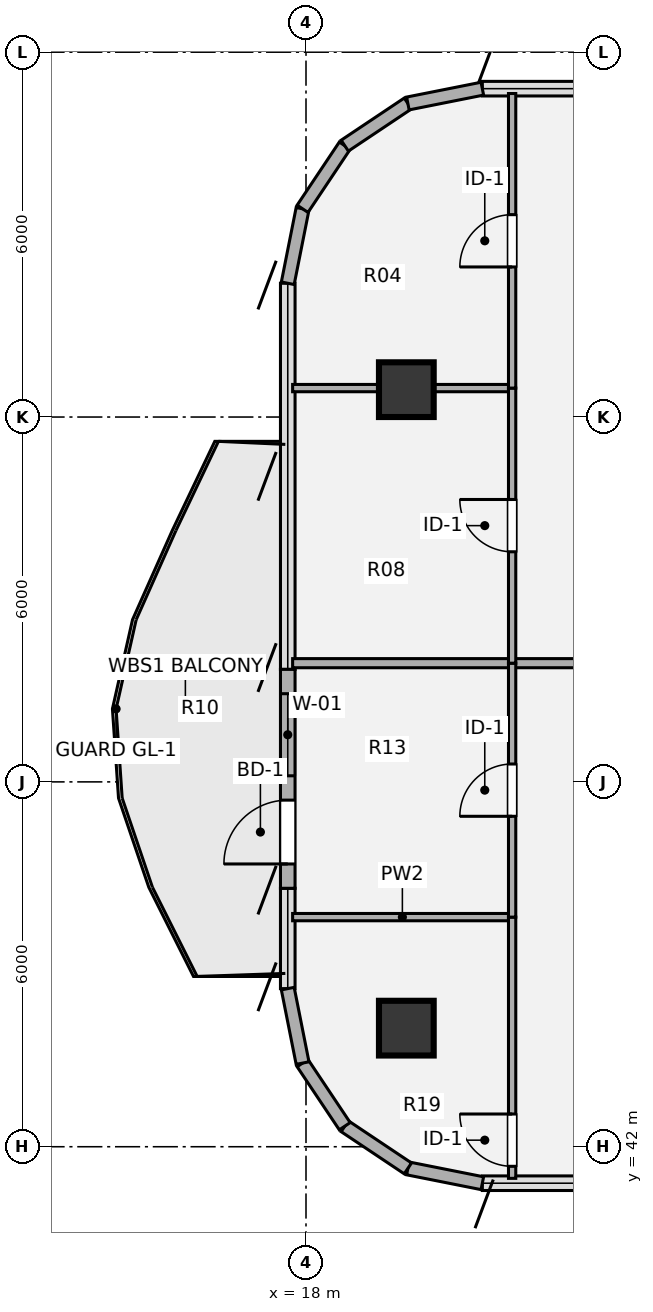
"""IFC4 building model, lengths in metres.
Left out: names, types, materials, properties, quantities, classifications, styles, units other than length and angle.
Written with IfcOpenShell. Run it as: python <this file> out.ifc"""

import sys

from ifc_helpers import new_model, si_unit, direction, frame, frame_2d, origin, origin_2d, place, context, subcontext, project, spatial, rectangle, hollow_circle, extrude, source, transform, mapped, element, fill, save


model = new_model("IFC4")
c1 = context("Model", 3, precision=1e-05, world=origin(), true_north=direction((0.0, 1.0)))
c2 = subcontext(c1, "Body", "Model", "MODEL_VIEW")
j1 = project(units=[si_unit("LENGTHUNIT", "METRE"), si_unit("PLANEANGLEUNIT", "RADIAN")], contexts=[c1])
p1 = place(None, origin())
s1 = spatial("IfcSite", under=j1, at=p1, CompositionType="ELEMENT")
p2 = place(p1, origin())
s2 = spatial("IfcBuilding", under=s1, at=p2, CompositionType="ELEMENT")
p3 = place(p2, frame((0.0, 0.0, 223.02)))
s3 = spatial("IfcBuildingStorey", under=s2, at=p3, CompositionType="ELEMENT", Elevation=223.02)
m1 = source(origin(), c2, "Body", "SweptSolid", [
    extrude(hollow_circle(Radius=0.45, WallThickness=0.032, at=origin_2d()), origin(), (0.0, 0.0, 1.0), 3.78),
])
for number, where, z_axis, x_axis in (
    (1, (19.65, 43.95, 0.0), (0.0, 0.0, 1.0), (1.0, 0.0, 0.0)),
    (2, (19.65, 54.45, 0.0), (0.0, 0.0, 1.0), (1.0, 0.0, 0.0)),
):
    element("IfcColumn", number, at=place(p3, frame(where, z_axis=z_axis, x_axis=x_axis)), inside=s3, PredefinedType="COLUMN", context=c2, shape_type="MappedRepresentation", body=[
        mapped(m1, transform((0.0, 0.0, 0.0), x_axis=(1.0, 0.0, 0.0), y_axis=(0.0, 1.0, 0.0), z_axis=(0.0, 0.0, 1.0), scale=1.0)),
    ])
for number, where, z_axis, x_axis in (
    (3, (20.9, 41.4, 0.0), (0.0, 0.0, 1.0), (-0.981, 0.195, 0.0)),
    (4, (19.675, 41.644, 0.0), (0.0, 0.0, 1.0), (-0.831, 0.556, 0.0)),
    (5, (18.637, 42.337, 0.0), (0.0, 0.0, 1.0), (-0.556, 0.831, 0.0)),
    (6, (17.944, 43.375, 0.0), (0.0, 0.0, 1.0), (-0.195, 0.981, 0.0)),
):
    element("IfcWall", number, at=place(p3, frame(where, z_axis=z_axis, x_axis=x_axis)), inside=s3, PredefinedType="SOLIDWALL", context=c2, shape_type="SweptSolid", body=[
        extrude(rectangle(XDim=1.249, YDim=0.215, at=frame_2d((0.624, 0.0))), origin(), (0.0, 0.0, 1.0), 3.53),
    ])
p4 = place(p3, frame((17.7, 46.25, 0.0), z_axis=(0.0, 0.0, 1.0), x_axis=(0.0, 1.0, 0.0)))
e7 = element("IfcWall", 7, at=p4, inside=s3, PredefinedType="SOLIDWALL", context=c2, shape_type="SweptSolid", body=[
    extrude(rectangle(XDim=3.6, YDim=0.24, at=frame_2d((1.8, 0.0))), origin(), (0.0, 0.0, 1.0), 3.53),
])
p5 = place(p4, frame((0.4, 0.0, 0.0)))
e8 = element("IfcOpeningElement", 8, at=p5, cuts=e7, PredefinedType="OPENING", context=c2, shape_type="SweptSolid", body=[
    extrude(rectangle(XDim=1.05, YDim=2.15, at=origin_2d()), frame((0.525, 0.13, 1.075), z_axis=(0.0, -1.0, 0.0), x_axis=(1.0, 0.0, 0.0)), (0.0, 0.0, 1.0), 0.26),
])
p6 = place(p4, frame((1.85, 0.0, 0.85)))
e9 = element("IfcOpeningElement", 9, at=p6, cuts=e7, PredefinedType="OPENING", context=c2, shape_type="SweptSolid", body=[
    extrude(rectangle(XDim=1.35, YDim=1.35, at=origin_2d()), frame((0.675, 0.13, 0.675), z_axis=(0.0, -1.0, 0.0), x_axis=(1.0, 0.0, 0.0)), (0.0, 0.0, 1.0), 0.26),
])
for number, where, z_axis, x_axis in (
    (10, (17.7, 56.2, 0.0), (0.0, 0.0, 1.0), (0.195, 0.981, 0.0)),
    (11, (17.944, 57.425, 0.0), (0.0, 0.0, 1.0), (0.556, 0.831, 0.0)),
    (12, (18.637, 58.463, 0.0), (0.0, 0.0, 1.0), (0.831, 0.556, 0.0)),
    (13, (19.675, 59.156, 0.0), (0.0, 0.0, 1.0), (0.981, 0.195, 0.0)),
):
    element("IfcWall", number, at=place(p3, frame(where, z_axis=z_axis, x_axis=x_axis)), inside=s3, PredefinedType="SOLIDWALL", context=c2, shape_type="SweptSolid", body=[
        extrude(rectangle(XDim=1.249, YDim=0.215, at=frame_2d((0.624, 0.0))), origin(), (0.0, 0.0, 1.0), 3.53),
    ])
p7 = place(p3, frame((17.78, 45.776, 0.0), z_axis=(0.0, 0.0, 1.0), x_axis=(1.0, 0.0, 0.0)))
e14 = element("IfcWall", 14, at=p7, inside=s3, PredefinedType="PARTITIONING", context=c2, shape_type="SweptSolid", body=[
    extrude(rectangle(XDim=3.61, YDim=0.12, at=frame_2d((1.805, 0.0))), origin(), (0.0, 0.0, 1.0), 2.982),
])
p8 = place(p3, frame((17.78, 49.952, 0.0), z_axis=(0.0, 0.0, 1.0), x_axis=(1.0, 0.0, 0.0)))
e15 = element("IfcWall", 15, at=p8, inside=s3, PredefinedType="PARTITIONING", context=c2, shape_type="SweptSolid", body=[
    extrude(rectangle(XDim=15.77, YDim=0.15, at=frame_2d((7.885, 0.0))), origin(), (0.0, 0.0, 1.0), 2.982),
])
p9 = place(p3, frame((17.78, 54.476, 0.0), z_axis=(0.0, 0.0, 1.0), x_axis=(1.0, 0.0, 0.0)))
e16 = element("IfcWall", 16, at=p9, inside=s3, PredefinedType="PARTITIONING", context=c2, shape_type="SweptSolid", body=[
    extrude(rectangle(XDim=3.61, YDim=0.12, at=frame_2d((1.805, 0.0))), origin(), (0.0, 0.0, 1.0), 2.903),
])
p10 = place(p3, frame((21.39, 41.48, 0.0), z_axis=(0.0, 0.0, 1.0), x_axis=(0.0, 1.0, 0.0)))
e17 = element("IfcWall", 17, at=p10, inside=s3, PredefinedType="PARTITIONING", context=c2, shape_type="SweptSolid", body=[
    extrude(rectangle(XDim=4.296, YDim=0.12, at=frame_2d((2.148, 0.0))), origin(), (0.0, 0.0, 1.0), 3.5),
])
p11 = place(p10, frame((0.198, 0.0, 0.0)))
e18 = element("IfcOpeningElement", 18, at=p11, cuts=e17, PredefinedType="OPENING", context=c2, shape_type="SweptSolid", body=[
    extrude(rectangle(XDim=0.86, YDim=2.1, at=origin_2d()), frame((0.43, 0.07, 1.05), z_axis=(0.0, -1.0, 0.0), x_axis=(1.0, 0.0, 0.0)), (0.0, 0.0, 1.0), 0.14),
])
p12 = place(p3, frame((21.39, 45.776, 0.0), z_axis=(0.0, 0.0, 1.0), x_axis=(0.0, 1.0, 0.0)))
e19 = element("IfcWall", 19, at=p12, inside=s3, PredefinedType="PARTITIONING", context=c2, shape_type="SweptSolid", body=[
    extrude(rectangle(XDim=4.176, YDim=0.12, at=frame_2d((2.088, 0.0))), origin(), (0.0, 0.0, 1.0), 3.5),
])
p13 = place(p12, frame((1.658, 0.0, 0.0)))
e20 = element("IfcOpeningElement", 20, at=p13, cuts=e19, PredefinedType="OPENING", context=c2, shape_type="SweptSolid", body=[
    extrude(rectangle(XDim=0.86, YDim=2.1, at=origin_2d()), frame((0.43, 0.07, 1.05), z_axis=(0.0, -1.0, 0.0), x_axis=(1.0, 0.0, 0.0)), (0.0, 0.0, 1.0), 0.14),
])
p14 = place(p3, frame((21.39, 49.952, 0.0), z_axis=(0.0, 0.0, 1.0), x_axis=(0.0, 1.0, 0.0)))
e21 = element("IfcWall", 21, at=p14, inside=s3, PredefinedType="PARTITIONING", context=c2, shape_type="SweptSolid", body=[
    extrude(rectangle(XDim=4.524, YDim=0.12, at=frame_2d((2.262, 0.0))), origin(), (0.0, 0.0, 1.0), 3.5),
])
p15 = place(p14, frame((1.832, 0.0, 0.0)))
e22 = element("IfcOpeningElement", 22, at=p15, cuts=e21, PredefinedType="OPENING", context=c2, shape_type="SweptSolid", body=[
    extrude(rectangle(XDim=0.86, YDim=2.1, at=origin_2d()), frame((0.43, 0.07, 1.05), z_axis=(0.0, -1.0, 0.0), x_axis=(1.0, 0.0, 0.0)), (0.0, 0.0, 1.0), 0.14),
])
p16 = place(p3, frame((21.39, 54.476, 0.0), z_axis=(0.0, 0.0, 1.0), x_axis=(0.0, 1.0, 0.0)))
e23 = element("IfcWall", 23, at=p16, inside=s3, PredefinedType="PARTITIONING", context=c2, shape_type="SweptSolid", body=[
    extrude(rectangle(XDim=4.844, YDim=0.12, at=frame_2d((2.422, 0.0))), origin(), (0.0, 0.0, 1.0), 3.5),
])
p17 = place(p16, frame((1.992, 0.0, 0.0)))
e24 = element("IfcOpeningElement", 24, at=p17, cuts=e23, PredefinedType="OPENING", context=c2, shape_type="SweptSolid", body=[
    extrude(rectangle(XDim=0.86, YDim=2.1, at=origin_2d()), frame((0.43, 0.07, 1.05), z_axis=(0.0, -1.0, 0.0), x_axis=(1.0, 0.0, 0.0)), (0.0, 0.0, 1.0), 0.14),
])
m2 = source(origin(), c2, "Body", "SweptSolid", [
    extrude(rectangle(XDim=1.05, YDim=2.15, at=origin_2d()), frame((0.525, 0.025, 1.075), z_axis=(0.0, -1.0, 0.0), x_axis=(1.0, 0.0, 0.0)), (0.0, 0.0, 1.0), 0.05),
])
p18 = place(p5, origin())
e25 = element("IfcDoor", 25, at=p18, inside=s3, OperationType="SINGLE_SWING_LEFT", PredefinedType="DOOR", context=c2, shape_type="MappedRepresentation", body=[
    mapped(m2, transform((0.0, 0.0, 0.0), x_axis=(1.0, 0.0, 0.0), y_axis=(0.0, 1.0, 0.0), z_axis=(0.0, 0.0, 1.0), scale=1.0)),
])
fill(e8, e25)
m3 = source(origin(), c2, "Body", "SweptSolid", [
    extrude(rectangle(XDim=1.35, YDim=1.35, at=origin_2d()), frame((0.675, 0.03, 0.675), z_axis=(0.0, -1.0, 0.0), x_axis=(1.0, 0.0, 0.0)), (0.0, 0.0, 1.0), 0.06),
])
p19 = place(p6, origin())
e26 = element("IfcWindow", 26, at=p19, inside=s3, PartitioningType="SINGLE_PANEL", PredefinedType="WINDOW", context=c2, shape_type="MappedRepresentation", body=[
    mapped(m3, transform((0.0, 0.0, 0.0), x_axis=(1.0, 0.0, 0.0), y_axis=(0.0, 1.0, 0.0), z_axis=(0.0, 0.0, 1.0), scale=1.0)),
])
fill(e9, e26)
m4 = source(origin(), c2, "Body", "SweptSolid", [
    extrude(rectangle(XDim=0.86, YDim=2.1, at=origin_2d()), frame((0.43, 0.025, 1.05), z_axis=(0.0, -1.0, 0.0), x_axis=(1.0, 0.0, 0.0)), (0.0, 0.0, 1.0), 0.05),
])
p20 = place(p11, origin())
e27 = element("IfcDoor", 27, at=p20, inside=s3, OperationType="SINGLE_SWING_RIGHT", PredefinedType="DOOR", context=c2, shape_type="MappedRepresentation", body=[
    mapped(m4, transform((0.0, 0.0, 0.0), x_axis=(1.0, 0.0, 0.0), y_axis=(0.0, 1.0, 0.0), z_axis=(0.0, 0.0, 1.0), scale=1.0)),
])
fill(e18, e27)
p21 = place(p13, origin())
e28 = element("IfcDoor", 28, at=p21, inside=s3, OperationType="SINGLE_SWING_LEFT", PredefinedType="DOOR", context=c2, shape_type="MappedRepresentation", body=[
    mapped(m4, transform((0.0, 0.0, 0.0), x_axis=(1.0, 0.0, 0.0), y_axis=(0.0, 1.0, 0.0), z_axis=(0.0, 0.0, 1.0), scale=1.0)),
])
fill(e20, e28)
p22 = place(p15, origin())
e29 = element("IfcDoor", 29, at=p22, inside=s3, OperationType="SINGLE_SWING_RIGHT", PredefinedType="DOOR", context=c2, shape_type="MappedRepresentation", body=[
    mapped(m4, transform((0.0, 0.0, 0.0), x_axis=(1.0, 0.0, 0.0), y_axis=(0.0, 1.0, 0.0), z_axis=(0.0, 0.0, 1.0), scale=1.0)),
])
fill(e22, e29)
p23 = place(p17, origin())
e30 = element("IfcDoor", 30, at=p23, inside=s3, OperationType="SINGLE_SWING_LEFT", PredefinedType="DOOR", context=c2, shape_type="MappedRepresentation", body=[
    mapped(m4, transform((0.0, 0.0, 0.0), x_axis=(1.0, 0.0, 0.0), y_axis=(0.0, 1.0, 0.0), z_axis=(0.0, 0.0, 1.0), scale=1.0)),
])
fill(e24, e30)
save(model, sys.argv[1])
